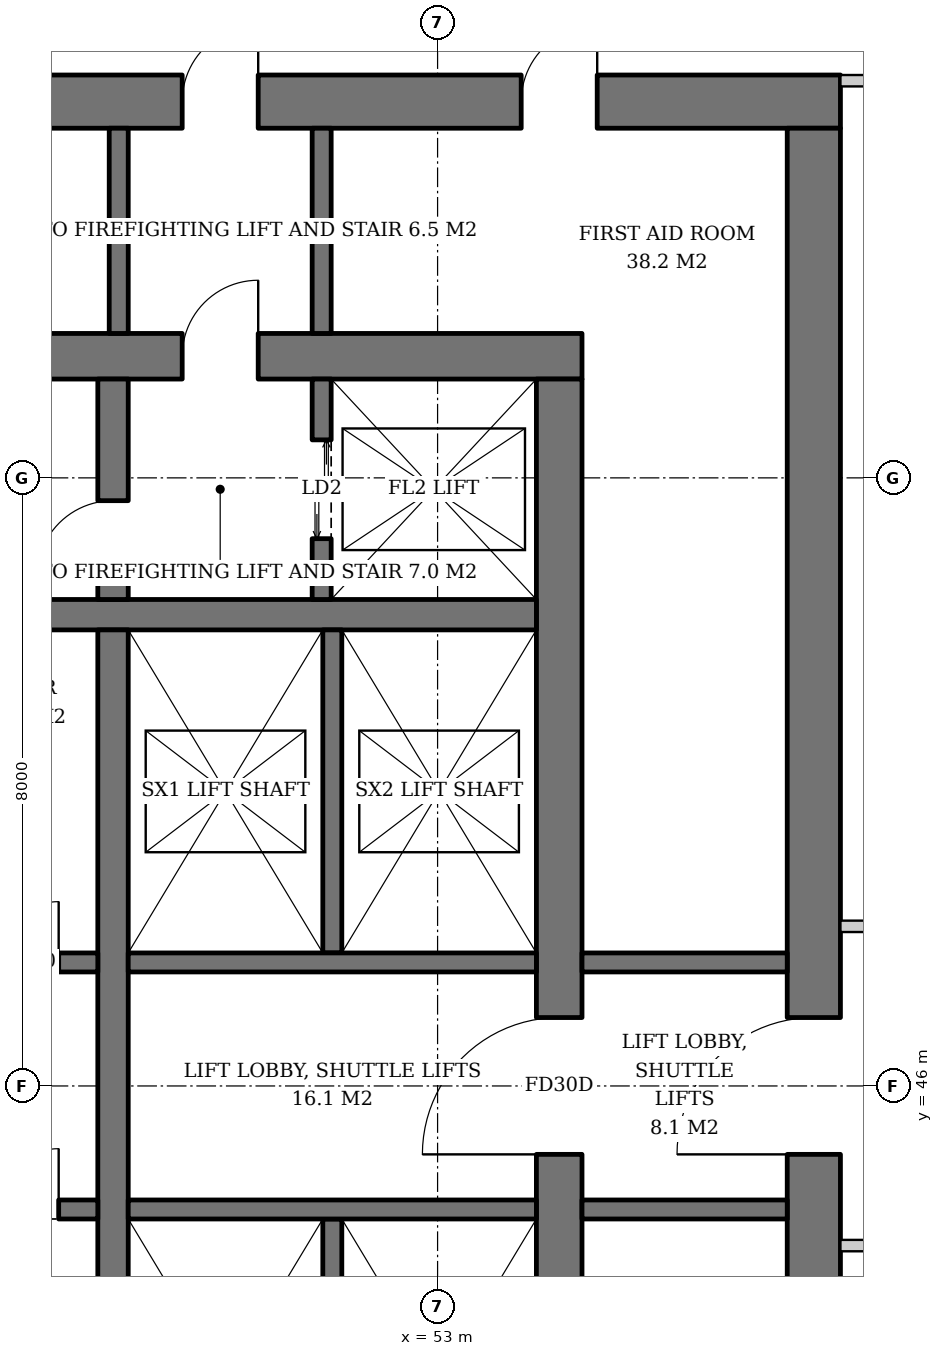
"""IFC4 building model, lengths in metres.
Left out: names, types, materials, properties, quantities, classifications, styles, units other than length and angle.
Written with IfcOpenShell. Run it as: python <this file> out.ifc"""

import sys

from ifc_helpers import new_model, si_unit, direction, frame, frame_2d, origin, place, context, subcontext, project, spatial, rectangle, extrude, element, fill, save


model = new_model("IFC4")
c1 = context("Model", 3, precision=1e-05, world=origin(), true_north=direction((0.0, 1.0)))
c2 = subcontext(c1, "Body", "Model", "MODEL_VIEW")
j1 = project(units=[si_unit("LENGTHUNIT", "METRE"), si_unit("PLANEANGLEUNIT", "RADIAN")], contexts=[c1])
p1 = place(None, origin())
s1 = spatial("IfcSite", under=j1, at=p1, CompositionType="ELEMENT")
p2 = place(p1, origin())
s2 = spatial("IfcBuilding", under=s1, at=p2, CompositionType="ELEMENT")
p3 = place(p2, frame((0.0, 0.0, 119.8)))
s3 = spatial("IfcBuildingStorey", under=s2, at=p3, CompositionType="ELEMENT", Elevation=119.8)
p4 = place(p3, frame((35.1, 55.6, 0.0), z_axis=(0.0, 0.0, 1.0), x_axis=(1.0, 0.0, 0.0)))
e1 = element("IfcWall", 1, at=p4, inside=s3, PredefinedType="SHEAR", context=c2, shape_type="SweptSolid", body=[
    extrude(rectangle(XDim=19.8, YDim=0.6, at=frame_2d((9.9, 0.0))), origin(), (0.0, 0.0, 1.0), 3.8),
])
p5 = place(p4, frame((14.54, 0.0, 0.0)))
e2 = element("IfcOpeningElement", 2, at=p5, cuts=e1, PredefinedType="OPENING", context=c2, shape_type="SweptSolid", body=[
    extrude(rectangle(XDim=1.0, YDim=2.1, at=frame_2d((0.5, 1.05))), frame((0.0, 0.31, 0.0), z_axis=(0.0, -1.0, 0.0), x_axis=(1.0, 0.0, 0.0)), (0.0, 0.0, 1.0), 0.62),
])
p6 = place(p4, frame((2.425, 0.0, 0.0)))
e3 = element("IfcOpeningElement", 3, at=p6, cuts=e1, PredefinedType="OPENING", context=c2, shape_type="SweptSolid", body=[
    extrude(rectangle(XDim=1.0, YDim=2.1, at=frame_2d((0.5, 1.05))), frame((0.0, 0.31, 0.0), z_axis=(0.0, -1.0, 0.0), x_axis=(1.0, 0.0, 0.0)), (0.0, 0.0, 1.0), 0.62),
])
p7 = place(p3, frame((54.6, 36.7, 0.0), z_axis=(0.0, 0.0, 1.0), x_axis=(0.0, 1.0, 0.0)))
e4 = element("IfcWall", 4, at=p7, inside=s3, PredefinedType="SHEAR", context=c2, shape_type="SweptSolid", body=[
    extrude(rectangle(XDim=18.6, YDim=0.6, at=frame_2d((9.3, 0.0))), origin(), (0.0, 0.0, 1.0), 3.8),
])
p8 = place(p7, frame((8.4, 0.0, 0.0)))
e5 = element("IfcOpeningElement", 5, at=p8, cuts=e4, PredefinedType="OPENING", context=c2, shape_type="SweptSolid", body=[
    extrude(rectangle(XDim=1.8, YDim=2.4, at=frame_2d((0.9, 1.2))), frame((0.0, 0.31, 0.0), z_axis=(0.0, -1.0, 0.0), x_axis=(1.0, 0.0, 0.0)), (0.0, 0.0, 1.0), 0.62),
])
p9 = place(p3, frame((31.7, 58.95, 0.0), z_axis=(0.0, 0.0, 1.0), x_axis=(1.0, 0.0, 0.0)))
e6 = element("IfcWall", 6, at=p9, inside=s3, PredefinedType="SHEAR", context=c2, shape_type="SweptSolid", body=[
    extrude(rectangle(XDim=26.6, YDim=0.7, at=frame_2d((13.3, 0.0))), origin(), (0.0, 0.0, 1.0), 3.8),
])
p10 = place(p9, frame((17.94, 0.0, 0.0)))
e7 = element("IfcOpeningElement", 7, at=p10, cuts=e6, PredefinedType="OPENING", context=c2, shape_type="SweptSolid", body=[
    extrude(rectangle(XDim=1.0, YDim=2.1, at=frame_2d((0.5, 1.05))), frame((0.0, 0.36, 0.0), z_axis=(0.0, -1.0, 0.0), x_axis=(1.0, 0.0, 0.0)), (0.0, 0.0, 1.0), 0.72),
])
p11 = place(p9, frame((5.825, 0.0, 0.0)))
e8 = element("IfcOpeningElement", 8, at=p11, cuts=e6, PredefinedType="OPENING", context=c2, shape_type="SweptSolid", body=[
    extrude(rectangle(XDim=1.0, YDim=2.1, at=frame_2d((0.5, 1.05))), frame((0.0, 0.36, 0.0), z_axis=(0.0, -1.0, 0.0), x_axis=(1.0, 0.0, 0.0)), (0.0, 0.0, 1.0), 0.72),
])
p12 = place(p9, frame((0.978, 0.0, 0.0)))
e9 = element("IfcOpeningElement", 9, at=p12, cuts=e6, PredefinedType="OPENING", context=c2, shape_type="SweptSolid", body=[
    extrude(rectangle(XDim=1.0, YDim=2.1, at=frame_2d((0.5, 1.05))), frame((0.0, 0.36, 0.0), z_axis=(0.0, -1.0, 0.0), x_axis=(1.0, 0.0, 0.0)), (0.0, 0.0, 1.0), 0.72),
])
p13 = place(p9, frame((2.492, 0.0, 0.0)))
e10 = element("IfcOpeningElement", 10, at=p13, cuts=e6, PredefinedType="OPENING", context=c2, shape_type="SweptSolid", body=[
    extrude(rectangle(XDim=1.0, YDim=2.1, at=frame_2d((0.5, 1.05))), frame((0.0, 0.36, 0.0), z_axis=(0.0, -1.0, 0.0), x_axis=(1.0, 0.0, 0.0)), (0.0, 0.0, 1.0), 0.72),
])
p14 = place(p9, frame((4.115, 0.0, 0.0)))
e11 = element("IfcOpeningElement", 11, at=p14, cuts=e6, PredefinedType="OPENING", context=c2, shape_type="SweptSolid", body=[
    extrude(rectangle(XDim=1.0, YDim=2.1, at=frame_2d((0.5, 1.05))), frame((0.0, 0.36, 0.0), z_axis=(0.0, -1.0, 0.0), x_axis=(1.0, 0.0, 0.0)), (0.0, 0.0, 1.0), 0.72),
])
p15 = place(p9, frame((9.126, 0.0, 0.0)))
e12 = element("IfcOpeningElement", 12, at=p15, cuts=e6, PredefinedType="OPENING", context=c2, shape_type="SweptSolid", body=[
    extrude(rectangle(XDim=1.0, YDim=2.1, at=frame_2d((0.5, 1.05))), frame((0.0, 0.36, 0.0), z_axis=(0.0, -1.0, 0.0), x_axis=(1.0, 0.0, 0.0)), (0.0, 0.0, 1.0), 0.72),
])
p16 = place(p9, frame((14.029, 0.0, 0.0)))
e13 = element("IfcOpeningElement", 13, at=p16, cuts=e6, PredefinedType="OPENING", context=c2, shape_type="SweptSolid", body=[
    extrude(rectangle(XDim=1.0, YDim=2.1, at=frame_2d((0.5, 1.05))), frame((0.0, 0.36, 0.0), z_axis=(0.0, -1.0, 0.0), x_axis=(1.0, 0.0, 0.0)), (0.0, 0.0, 1.0), 0.72),
])
p17 = place(p9, frame((22.4, 0.0, 0.0)))
e14 = element("IfcOpeningElement", 14, at=p17, cuts=e6, PredefinedType="OPENING", context=c2, shape_type="SweptSolid", body=[
    extrude(rectangle(XDim=1.0, YDim=2.1, at=frame_2d((0.5, 1.05))), frame((0.0, 0.36, 0.0), z_axis=(0.0, -1.0, 0.0), x_axis=(1.0, 0.0, 0.0)), (0.0, 0.0, 1.0), 0.72),
])
p18 = place(p3, frame((57.95, 33.4, 0.0), z_axis=(0.0, 0.0, 1.0), x_axis=(0.0, 1.0, 0.0)))
e15 = element("IfcWall", 15, at=p18, inside=s3, PredefinedType="SHEAR", context=c2, shape_type="SweptSolid", body=[
    extrude(rectangle(XDim=25.2, YDim=0.7, at=frame_2d((12.6, 0.0))), origin(), (0.0, 0.0, 1.0), 3.8),
])
p19 = place(p18, frame((11.7, 0.0, 0.0)))
e16 = element("IfcOpeningElement", 16, at=p19, cuts=e15, PredefinedType="OPENING", context=c2, shape_type="SweptSolid", body=[
    extrude(rectangle(XDim=1.8, YDim=2.4, at=frame_2d((0.9, 1.2))), frame((0.0, 0.36, 0.0), z_axis=(0.0, -1.0, 0.0), x_axis=(1.0, 0.0, 0.0)), (0.0, 0.0, 1.0), 0.72),
])
p20 = place(p3, frame((35.7, 52.2, 0.0), z_axis=(0.0, 0.0, 1.0), x_axis=(1.0, 0.0, 0.0)))
e17 = element("IfcWall", 17, at=p20, inside=s3, PredefinedType="SHEAR", context=c2, shape_type="SweptSolid", body=[
    extrude(rectangle(XDim=18.6, YDim=0.4, at=frame_2d((9.3, 0.0))), origin(), (0.0, 0.0, 1.0), 3.8),
])
p21 = place(p3, frame((48.73, 40.0, 0.0), z_axis=(0.0, 0.0, 1.0), x_axis=(0.0, 1.0, 0.0)))
e18 = element("IfcWall", 18, at=p21, inside=s3, PredefinedType="SHEAR", context=c2, shape_type="SweptSolid", body=[
    extrude(rectangle(XDim=12.0, YDim=0.4, at=frame_2d((6.0, 0.0))), origin(), (0.0, 0.0, 1.0), 3.8),
])
p22 = place(p3, frame((48.73, 52.4, 0.0), z_axis=(0.0, 0.0, 1.0), x_axis=(0.0, 1.0, 0.0)))
e19 = element("IfcWall", 19, at=p22, inside=s3, PredefinedType="SHEAR", context=c2, shape_type="SweptSolid", body=[
    extrude(rectangle(XDim=2.9, YDim=0.4, at=frame_2d((1.45, 0.0))), origin(), (0.0, 0.0, 1.0), 3.8),
])
p23 = place(p22, frame((0.3, 0.0, 0.0)))
e20 = element("IfcOpeningElement", 20, at=p23, cuts=e19, PredefinedType="OPENING", context=c2, shape_type="SweptSolid", body=[
    extrude(rectangle(XDim=1.0, YDim=2.1, at=frame_2d((0.5, 1.05))), frame((0.0, 0.21, 0.0), z_axis=(0.0, -1.0, 0.0), x_axis=(1.0, 0.0, 0.0)), (0.0, 0.0, 1.0), 0.42),
])
p24 = place(p3, frame((51.475, 52.4, 0.0), z_axis=(0.0, 0.0, 1.0), x_axis=(0.0, 1.0, 0.0)))
e21 = element("IfcWall", 21, at=p24, inside=s3, PredefinedType="SHEAR", context=c2, shape_type="SweptSolid", body=[
    extrude(rectangle(XDim=2.9, YDim=0.25, at=frame_2d((1.45, 0.0))), origin(), (0.0, 0.0, 1.0), 3.8),
])
p25 = place(p24, frame((0.8, 0.0, 0.0)))
e22 = element("IfcOpeningElement", 22, at=p25, cuts=e21, PredefinedType="OPENING", context=c2, shape_type="SweptSolid", body=[
    extrude(rectangle(XDim=1.3, YDim=2.2, at=frame_2d((0.65, 1.1))), frame((0.0, 0.135, 0.0), z_axis=(0.0, -1.0, 0.0), x_axis=(1.0, 0.0, 0.0)), (0.0, 0.0, 1.0), 0.27),
])
p26 = place(p3, frame((35.7, 47.625, 0.0), z_axis=(0.0, 0.0, 1.0), x_axis=(1.0, 0.0, 0.0)))
e23 = element("IfcWall", 23, at=p26, inside=s3, PredefinedType="SHEAR", context=c2, shape_type="SweptSolid", body=[
    extrude(rectangle(XDim=12.83, YDim=0.25, at=frame_2d((6.415, 0.0))), origin(), (0.0, 0.0, 1.0), 3.8),
])
p27 = place(p26, frame((0.7, 0.0, 0.0)))
e24 = element("IfcOpeningElement", 24, at=p27, cuts=e23, PredefinedType="OPENING", context=c2, shape_type="SweptSolid", body=[
    extrude(rectangle(XDim=1.1, YDim=2.2, at=frame_2d((0.55, 1.1))), frame((0.0, 0.135, 0.0), z_axis=(0.0, -1.0, 0.0), x_axis=(1.0, 0.0, 0.0)), (0.0, 0.0, 1.0), 0.27),
])
p28 = place(p26, frame((3.45, 0.0, 0.0)))
e25 = element("IfcOpeningElement", 25, at=p28, cuts=e23, PredefinedType="OPENING", context=c2, shape_type="SweptSolid", body=[
    extrude(rectangle(XDim=1.1, YDim=2.2, at=frame_2d((0.55, 1.1))), frame((0.0, 0.135, 0.0), z_axis=(0.0, -1.0, 0.0), x_axis=(1.0, 0.0, 0.0)), (0.0, 0.0, 1.0), 0.27),
])
p29 = place(p26, frame((6.2, 0.0, 0.0)))
e26 = element("IfcOpeningElement", 26, at=p29, cuts=e23, PredefinedType="OPENING", context=c2, shape_type="SweptSolid", body=[
    extrude(rectangle(XDim=1.1, YDim=2.2, at=frame_2d((0.55, 1.1))), frame((0.0, 0.135, 0.0), z_axis=(0.0, -1.0, 0.0), x_axis=(1.0, 0.0, 0.0)), (0.0, 0.0, 1.0), 0.27),
])
p30 = place(p26, frame((8.95, 0.0, 0.0)))
e27 = element("IfcOpeningElement", 27, at=p30, cuts=e23, PredefinedType="OPENING", context=c2, shape_type="SweptSolid", body=[
    extrude(rectangle(XDim=1.1, YDim=2.2, at=frame_2d((0.55, 1.1))), frame((0.0, 0.135, 0.0), z_axis=(0.0, -1.0, 0.0), x_axis=(1.0, 0.0, 0.0)), (0.0, 0.0, 1.0), 0.27),
])
p31 = place(p26, frame((11.515, 0.0, 0.0)))
e28 = element("IfcOpeningElement", 28, at=p31, cuts=e23, PredefinedType="OPENING", context=c2, shape_type="SweptSolid", body=[
    extrude(rectangle(XDim=0.8, YDim=2.0, at=frame_2d((0.4, 1.0))), frame((0.0, 0.135, 0.0), z_axis=(0.0, -1.0, 0.0), x_axis=(1.0, 0.0, 0.0)), (0.0, 0.0, 1.0), 0.27),
])
p32 = place(p3, frame((35.7, 44.375, 0.0), z_axis=(0.0, 0.0, 1.0), x_axis=(1.0, 0.0, 0.0)))
e29 = element("IfcWall", 29, at=p32, inside=s3, PredefinedType="SHEAR", context=c2, shape_type="SweptSolid", body=[
    extrude(rectangle(XDim=12.83, YDim=0.25, at=frame_2d((6.415, 0.0))), origin(), (0.0, 0.0, 1.0), 3.8),
])
p33 = place(p32, frame((0.7, 0.0, 0.0)))
e30 = element("IfcOpeningElement", 30, at=p33, cuts=e29, PredefinedType="OPENING", context=c2, shape_type="SweptSolid", body=[
    extrude(rectangle(XDim=1.1, YDim=2.2, at=frame_2d((0.55, 1.1))), frame((0.0, 0.135, 0.0), z_axis=(0.0, -1.0, 0.0), x_axis=(1.0, 0.0, 0.0)), (0.0, 0.0, 1.0), 0.27),
])
p34 = place(p32, frame((3.45, 0.0, 0.0)))
e31 = element("IfcOpeningElement", 31, at=p34, cuts=e29, PredefinedType="OPENING", context=c2, shape_type="SweptSolid", body=[
    extrude(rectangle(XDim=1.1, YDim=2.2, at=frame_2d((0.55, 1.1))), frame((0.0, 0.135, 0.0), z_axis=(0.0, -1.0, 0.0), x_axis=(1.0, 0.0, 0.0)), (0.0, 0.0, 1.0), 0.27),
])
p35 = place(p32, frame((6.2, 0.0, 0.0)))
e32 = element("IfcOpeningElement", 32, at=p35, cuts=e29, PredefinedType="OPENING", context=c2, shape_type="SweptSolid", body=[
    extrude(rectangle(XDim=1.1, YDim=2.2, at=frame_2d((0.55, 1.1))), frame((0.0, 0.135, 0.0), z_axis=(0.0, -1.0, 0.0), x_axis=(1.0, 0.0, 0.0)), (0.0, 0.0, 1.0), 0.27),
])
p36 = place(p32, frame((8.95, 0.0, 0.0)))
e33 = element("IfcOpeningElement", 33, at=p36, cuts=e29, PredefinedType="OPENING", context=c2, shape_type="SweptSolid", body=[
    extrude(rectangle(XDim=1.1, YDim=2.2, at=frame_2d((0.55, 1.1))), frame((0.0, 0.135, 0.0), z_axis=(0.0, -1.0, 0.0), x_axis=(1.0, 0.0, 0.0)), (0.0, 0.0, 1.0), 0.27),
])
p37 = place(p32, frame((11.515, 0.0, 0.0)))
e34 = element("IfcOpeningElement", 34, at=p37, cuts=e29, PredefinedType="OPENING", context=c2, shape_type="SweptSolid", body=[
    extrude(rectangle(XDim=0.8, YDim=2.0, at=frame_2d((0.4, 1.0))), frame((0.0, 0.135, 0.0), z_axis=(0.0, -1.0, 0.0), x_axis=(1.0, 0.0, 0.0)), (0.0, 0.0, 1.0), 0.27),
])
p38 = place(p3, frame((51.615, 47.75, 0.0), z_axis=(0.0, 0.0, 1.0), x_axis=(0.0, 1.0, 0.0)))
e35 = element("IfcWall", 35, at=p38, inside=s3, PredefinedType="SHEAR", context=c2, shape_type="SweptSolid", body=[
    extrude(rectangle(XDim=4.25, YDim=0.25, at=frame_2d((2.125, 0.0))), origin(), (0.0, 0.0, 1.0), 3.8),
])
p39 = place(p3, frame((48.93, 47.625, 0.0), z_axis=(0.0, 0.0, 1.0), x_axis=(1.0, 0.0, 0.0)))
e36 = element("IfcWall", 36, at=p39, inside=s3, PredefinedType="SHEAR", context=c2, shape_type="SweptSolid", body=[
    extrude(rectangle(XDim=5.37, YDim=0.25, at=frame_2d((2.685, 0.0))), origin(), (0.0, 0.0, 1.0), 3.8),
])
p40 = place(p3, frame((51.615, 44.25, 0.0), z_axis=(0.0, 0.0, 1.0), x_axis=(0.0, -1.0, 0.0)))
e37 = element("IfcWall", 37, at=p40, inside=s3, PredefinedType="SHEAR", context=c2, shape_type="SweptSolid", body=[
    extrude(rectangle(XDim=4.25, YDim=0.25, at=frame_2d((2.125, 0.0))), origin(), (0.0, 0.0, 1.0), 3.8),
])
p41 = place(p3, frame((48.93, 44.375, 0.0), z_axis=(0.0, 0.0, 1.0), x_axis=(1.0, 0.0, 0.0)))
e38 = element("IfcWall", 38, at=p41, inside=s3, PredefinedType="SHEAR", context=c2, shape_type="SweptSolid", body=[
    extrude(rectangle(XDim=5.37, YDim=0.25, at=frame_2d((2.685, 0.0))), origin(), (0.0, 0.0, 1.0), 3.8),
])
for number, where, z_axis, x_axis in (
    (39, (48.805, 55.9, 0.0), (0.0, 0.0, 1.0), (0.0, 1.0, 0.0)),
    (40, (51.475, 55.9, 0.0), (0.0, 0.0, 1.0), (0.0, 1.0, 0.0)),
    (41, (54.9, 44.375, 0.0), (0.0, 0.0, 1.0), (1.0, 0.0, 0.0)),
    (42, (54.9, 47.625, 0.0), (0.0, 0.0, 1.0), (1.0, 0.0, 0.0)),
):
    element("IfcWall", number, at=place(p3, frame(where, z_axis=z_axis, x_axis=x_axis)), inside=s3, PredefinedType="SOLIDWALL", context=c2, shape_type="SweptSolid", body=[
        extrude(rectangle(XDim=2.7, YDim=0.25, at=frame_2d((1.35, 0.0))), origin(), (0.0, 0.0, 1.0), 3.62),
    ])
for number, where, z_axis, x_axis in (
    (43, (58.3, 43.9, 0.0), (0.0, 0.0, 1.0), (1.0, 0.0, 0.0)),
    (44, (58.3, 48.1, 0.0), (0.0, 0.0, 1.0), (1.0, 0.0, 0.0)),
    (45, (58.3, 59.225, 0.0), (0.0, 0.0, 1.0), (1.0, 0.0, 0.0)),
):
    element("IfcWall", number, at=place(p3, frame(where, z_axis=z_axis, x_axis=x_axis)), inside=s3, PredefinedType="PARTITIONING", context=c2, shape_type="SweptSolid", body=[
        extrude(rectangle(XDim=2.325, YDim=0.15, at=frame_2d((1.163, 0.0))), origin(), (0.0, 0.0, 1.0), 3.62),
    ])
p42 = place(p25, origin())
e46 = element("IfcDoor", 46, at=p42, inside=s3, OperationType="DOUBLE_DOOR_SLIDING", PredefinedType="DOOR", context=c2, shape_type="SweptSolid", body=[
    extrude(rectangle(XDim=1.3, YDim=2.2, at=frame_2d((0.65, 1.1))), frame((0.0, 0.025, 0.0), z_axis=(0.0, -1.0, 0.0), x_axis=(1.0, 0.0, 0.0)), (0.0, 0.0, 1.0), 0.05),
])
fill(e22, e46)
p43 = place(p31, origin())
e47 = element("IfcDoor", 47, at=p43, inside=s3, OperationType="SINGLE_SWING_RIGHT", PredefinedType="DOOR", context=c2, shape_type="SweptSolid", body=[
    extrude(rectangle(XDim=0.8, YDim=2.0, at=frame_2d((0.4, 1.0))), frame((0.0, 0.025, 0.0), z_axis=(0.0, -1.0, 0.0), x_axis=(1.0, 0.0, 0.0)), (0.0, 0.0, 1.0), 0.05),
])
fill(e28, e47)
p44 = place(p37, origin())
e48 = element("IfcDoor", 48, at=p44, inside=s3, OperationType="SINGLE_SWING_RIGHT", PredefinedType="DOOR", context=c2, shape_type="SweptSolid", body=[
    extrude(rectangle(XDim=0.8, YDim=2.0, at=frame_2d((0.4, 1.0))), frame((0.0, 0.025, 0.0), z_axis=(0.0, -1.0, 0.0), x_axis=(1.0, 0.0, 0.0)), (0.0, 0.0, 1.0), 0.05),
])
fill(e34, e48)
p45 = place(p23, origin())
e49 = element("IfcDoor", 49, at=p45, inside=s3, OperationType="SINGLE_SWING_LEFT", PredefinedType="DOOR", context=c2, shape_type="SweptSolid", body=[
    extrude(rectangle(XDim=1.0, YDim=2.1, at=frame_2d((0.5, 1.05))), frame((0.0, 0.025, 0.0), z_axis=(0.0, -1.0, 0.0), x_axis=(1.0, 0.0, 0.0)), (0.0, 0.0, 1.0), 0.05),
])
fill(e20, e49)
p46 = place(p5, origin())
e50 = element("IfcDoor", 50, at=p46, inside=s3, OperationType="SINGLE_SWING_RIGHT", PredefinedType="DOOR", context=c2, shape_type="SweptSolid", body=[
    extrude(rectangle(XDim=1.0, YDim=2.1, at=frame_2d((0.5, 1.05))), frame((0.0, 0.025, 0.0), z_axis=(0.0, -1.0, 0.0), x_axis=(1.0, 0.0, 0.0)), (0.0, 0.0, 1.0), 0.05),
])
fill(e2, e50)
p47 = place(p8, origin())
e51 = element("IfcDoor", 51, at=p47, inside=s3, OperationType="DOUBLE_DOOR_SINGLE_SWING", PredefinedType="DOOR", context=c2, shape_type="SweptSolid", body=[
    extrude(rectangle(XDim=1.8, YDim=2.4, at=frame_2d((0.9, 1.2))), frame((0.0, 0.025, 0.0), z_axis=(0.0, -1.0, 0.0), x_axis=(1.0, 0.0, 0.0)), (0.0, 0.0, 1.0), 0.05),
])
fill(e5, e51)
p48 = place(p19, origin())
e52 = element("IfcDoor", 52, at=p48, inside=s3, OperationType="DOUBLE_DOOR_SINGLE_SWING", PredefinedType="DOOR", context=c2, shape_type="SweptSolid", body=[
    extrude(rectangle(XDim=1.8, YDim=2.4, at=frame_2d((0.9, 1.2))), frame((0.0, 0.025, 0.0), z_axis=(0.0, -1.0, 0.0), x_axis=(1.0, 0.0, 0.0)), (0.0, 0.0, 1.0), 0.05),
])
fill(e16, e52)
p49 = place(p10, origin())
e53 = element("IfcDoor", 53, at=p49, inside=s3, OperationType="SINGLE_SWING_RIGHT", PredefinedType="DOOR", context=c2, shape_type="SweptSolid", body=[
    extrude(rectangle(XDim=1.0, YDim=2.1, at=frame_2d((0.5, 1.05))), frame((0.0, 0.025, 0.0), z_axis=(0.0, -1.0, 0.0), x_axis=(1.0, 0.0, 0.0)), (0.0, 0.0, 1.0), 0.05),
])
fill(e7, e53)
p50 = place(p17, origin())
e54 = element("IfcDoor", 54, at=p50, inside=s3, OperationType="SINGLE_SWING_RIGHT", PredefinedType="DOOR", context=c2, shape_type="SweptSolid", body=[
    extrude(rectangle(XDim=1.0, YDim=2.1, at=frame_2d((0.5, 1.05))), frame((0.0, -0.29, 0.0), z_axis=(0.0, -1.0, 0.0), x_axis=(1.0, 0.0, 0.0)), (0.0, 0.0, 1.0), 0.05),
])
fill(e14, e54)
save(model, sys.argv[1])
